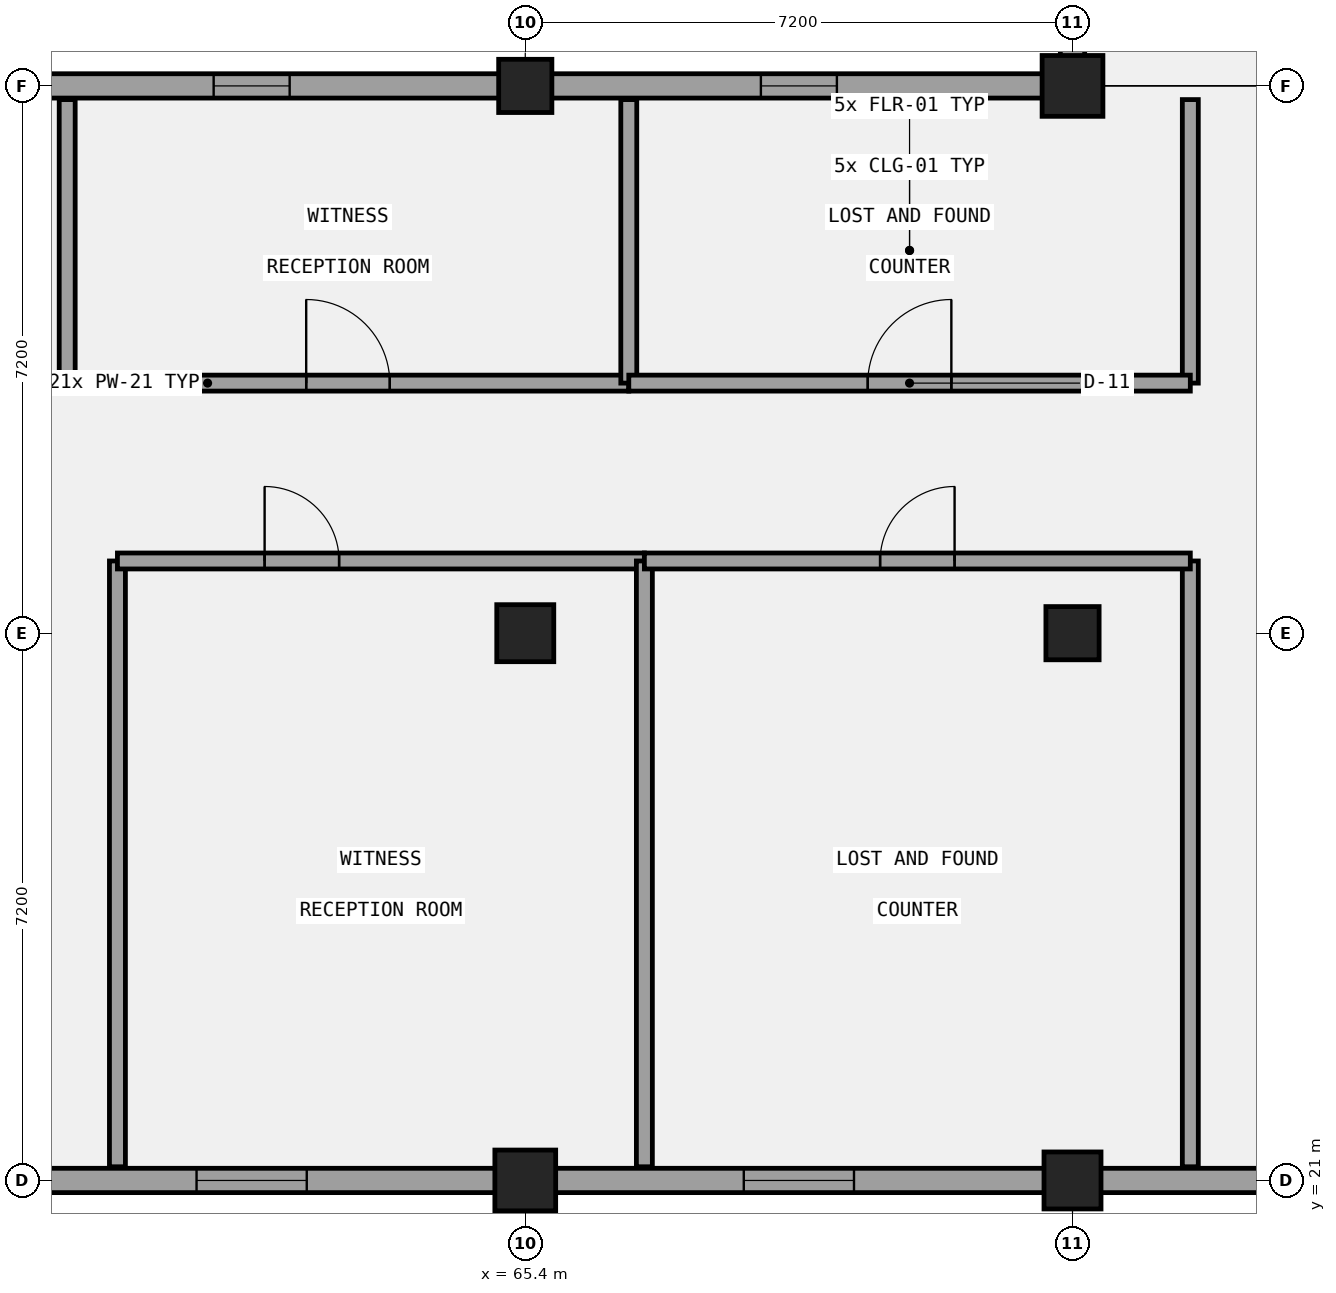
"""IFC4 building model, lengths in metres.
Left out: names, types, materials, properties, quantities, classifications, styles, units other than length and angle.
Written with IfcOpenShell. Run it as: python <this file> out.ifc"""

import sys

from ifc_helpers import new_model, si_unit, direction, frame, frame_2d, origin, origin_2d, place, context, subcontext, project, spatial, rectangle, circle, extrude, element, fill, save


model = new_model("IFC4")
c1 = context("Model", 3, precision=1e-05, world=origin(), true_north=direction((0.0, 1.0)))
c2 = subcontext(c1, "Body", "Model", "MODEL_VIEW")
j1 = project(units=[si_unit("LENGTHUNIT", "METRE"), si_unit("PLANEANGLEUNIT", "RADIAN")], contexts=[c1])
p1 = place(None, origin())
s1 = spatial("IfcSite", under=j1, at=p1, CompositionType="ELEMENT")
p2 = place(p1, origin())
s2 = spatial("IfcBuilding", under=s1, at=p2, CompositionType="ELEMENT")
p3 = place(p2, origin())
s3 = spatial("IfcBuildingStorey", under=s2, at=p3, CompositionType="ELEMENT", Elevation=0.0)
p4 = place(p3, frame((65.4, 21.0, 0.0), z_axis=(0.0, 0.0, 1.0), x_axis=(1.0, 0.0, 0.0)))
e1 = element("IfcColumn", 1, at=p4, inside=s3, PredefinedType="COLUMN", context=c2, shape_type="SweptSolid", body=[
    extrude(rectangle(XDim=0.8, YDim=0.8, at=origin_2d()), origin(), (0.0, 0.0, 1.0), 5.4),
])
p5 = place(p3, frame((65.4, 28.2, 0.0), z_axis=(0.0, 0.0, 1.0), x_axis=(1.0, 0.0, 0.0)))
e2 = element("IfcColumn", 2, at=p5, inside=s3, PredefinedType="COLUMN", context=c2, shape_type="SweptSolid", body=[
    extrude(rectangle(XDim=0.75, YDim=0.75, at=origin_2d()), origin(), (0.0, 0.0, 1.0), 5.4),
])
p6 = place(p3, frame((65.4, 35.4, 0.0), z_axis=(0.0, 0.0, 1.0), x_axis=(1.0, 0.0, 0.0)))
e3 = element("IfcColumn", 3, at=p6, inside=s3, PredefinedType="COLUMN", context=c2, shape_type="SweptSolid", body=[
    extrude(rectangle(XDim=0.7, YDim=0.7, at=origin_2d()), origin(), (0.0, 0.0, 1.0), 5.4),
])
p7 = place(p3, frame((72.6, 21.0, 0.0), z_axis=(0.0, 0.0, 1.0), x_axis=(1.0, 0.0, 0.0)))
e4 = element("IfcColumn", 4, at=p7, inside=s3, PredefinedType="COLUMN", context=c2, shape_type="SweptSolid", body=[
    extrude(rectangle(XDim=0.75, YDim=0.75, at=origin_2d()), origin(), (0.0, 0.0, 1.0), 5.4),
])
p8 = place(p3, frame((72.6, 28.2, 0.0), z_axis=(0.0, 0.0, 1.0), x_axis=(1.0, 0.0, 0.0)))
e5 = element("IfcColumn", 5, at=p8, inside=s3, PredefinedType="COLUMN", context=c2, shape_type="SweptSolid", body=[
    extrude(rectangle(XDim=0.7, YDim=0.7, at=origin_2d()), origin(), (0.0, 0.0, 1.0), 5.4),
])
p9 = place(p3, frame((72.6, 35.4, 0.0), z_axis=(0.0, 0.0, 1.0), x_axis=(1.0, 0.0, 0.0)))
e6 = element("IfcColumn", 6, at=p9, inside=s3, PredefinedType="COLUMN", context=c2, shape_type="SweptSolid", body=[
    extrude(circle(Radius=0.4, at=origin_2d()), origin(), (0.0, 0.0, 1.0), 5.4),
])
p10 = place(p3, frame((29.24, 21.0, 0.0), z_axis=(0.0, 0.0, 1.0), x_axis=(1.0, 0.0, 0.0)))
e7 = element("IfcWall", 7, at=p10, inside=s3, PredefinedType="SOLIDWALL", context=c2, shape_type="SweptSolid", body=[
    extrude(rectangle(XDim=50.72, YDim=0.32, at=frame_2d((25.36, 0.0))), origin(), (0.0, 0.0, 1.0), 3.35),
])
p11 = place(p10, frame((24.36, 0.0, 0.0)))
e8 = element("IfcOpeningElement", 8, at=p11, cuts=e7, PredefinedType="OPENING", context=c2, shape_type="SweptSolid", body=[
    extrude(rectangle(XDim=2.0, YDim=2.6, at=frame_2d((1.0, 1.3))), frame((0.0, 0.17, 0.0), z_axis=(0.0, -1.0, 0.0), x_axis=(1.0, 0.0, 0.0)), (0.0, 0.0, 1.0), 0.34),
])
p12 = place(p10, frame((3.035, 0.0, 1.0)))
e9 = element("IfcOpeningElement", 9, at=p12, cuts=e7, PredefinedType="OPENING", context=c2, shape_type="SweptSolid", body=[
    extrude(rectangle(XDim=1.45, YDim=1.65, at=frame_2d((0.725, 0.825))), frame((0.0, 0.17, 0.0), z_axis=(0.0, -1.0, 0.0), x_axis=(1.0, 0.0, 0.0)), (0.0, 0.0, 1.0), 0.34),
])
p13 = place(p10, frame((10.235, 0.0, 1.0)))
e10 = element("IfcOpeningElement", 10, at=p13, cuts=e7, PredefinedType="OPENING", context=c2, shape_type="SweptSolid", body=[
    extrude(rectangle(XDim=1.45, YDim=1.65, at=frame_2d((0.725, 0.825))), frame((0.0, 0.17, 0.0), z_axis=(0.0, -1.0, 0.0), x_axis=(1.0, 0.0, 0.0)), (0.0, 0.0, 1.0), 0.34),
])
p14 = place(p10, frame((17.435, 0.0, 1.0)))
e11 = element("IfcOpeningElement", 11, at=p14, cuts=e7, PredefinedType="OPENING", context=c2, shape_type="SweptSolid", body=[
    extrude(rectangle(XDim=1.45, YDim=1.65, at=frame_2d((0.725, 0.825))), frame((0.0, 0.17, 0.0), z_axis=(0.0, -1.0, 0.0), x_axis=(1.0, 0.0, 0.0)), (0.0, 0.0, 1.0), 0.34),
])
p15 = place(p10, frame((31.835, 0.0, 1.0)))
e12 = element("IfcOpeningElement", 12, at=p15, cuts=e7, PredefinedType="OPENING", context=c2, shape_type="SweptSolid", body=[
    extrude(rectangle(XDim=1.45, YDim=1.65, at=frame_2d((0.725, 0.825))), frame((0.0, 0.17, 0.0), z_axis=(0.0, -1.0, 0.0), x_axis=(1.0, 0.0, 0.0)), (0.0, 0.0, 1.0), 0.34),
])
p16 = place(p10, frame((39.035, 0.0, 1.0)))
e13 = element("IfcOpeningElement", 13, at=p16, cuts=e7, PredefinedType="OPENING", context=c2, shape_type="SweptSolid", body=[
    extrude(rectangle(XDim=1.45, YDim=1.65, at=frame_2d((0.725, 0.825))), frame((0.0, 0.17, 0.0), z_axis=(0.0, -1.0, 0.0), x_axis=(1.0, 0.0, 0.0)), (0.0, 0.0, 1.0), 0.34),
])
p17 = place(p10, frame((46.235, 0.0, 1.0)))
e14 = element("IfcOpeningElement", 14, at=p17, cuts=e7, PredefinedType="OPENING", context=c2, shape_type="SweptSolid", body=[
    extrude(rectangle(XDim=1.45, YDim=1.65, at=frame_2d((0.725, 0.825))), frame((0.0, 0.17, 0.0), z_axis=(0.0, -1.0, 0.0), x_axis=(1.0, 0.0, 0.0)), (0.0, 0.0, 1.0), 0.34),
])
p18 = place(p3, frame((72.6, 78.44, 0.0), z_axis=(0.0, 0.0, 1.0), x_axis=(0.0, -1.0, 0.0)))
e15 = element("IfcWall", 15, at=p18, inside=s3, PredefinedType="SOLIDWALL", context=c2, shape_type="SweptSolid", body=[
    extrude(rectangle(XDim=42.88, YDim=0.32, at=frame_2d((21.44, 0.0))), origin(), (0.0, 0.0, 1.0), 4.22),
])
p19 = place(p18, frame((38.86, 0.0, 1.0)))
e16 = element("IfcOpeningElement", 16, at=p19, cuts=e15, PredefinedType="OPENING", context=c2, shape_type="SweptSolid", body=[
    extrude(rectangle(XDim=1.0, YDim=1.65, at=frame_2d((0.5, 0.825))), frame((0.0, 0.17, 0.0), z_axis=(0.0, -1.0, 0.0), x_axis=(1.0, 0.0, 0.0)), (0.0, 0.0, 1.0), 0.34),
])
p20 = place(p18, frame((31.74, 0.0, 1.0)))
e17 = element("IfcOpeningElement", 17, at=p20, cuts=e15, PredefinedType="OPENING", context=c2, shape_type="SweptSolid", body=[
    extrude(rectangle(XDim=1.0, YDim=1.65, at=frame_2d((0.5, 0.825))), frame((0.0, 0.17, 0.0), z_axis=(0.0, -1.0, 0.0), x_axis=(1.0, 0.0, 0.0)), (0.0, 0.0, 1.0), 0.34),
])
p21 = place(p18, frame((24.54, 0.0, 1.0)))
e18 = element("IfcOpeningElement", 18, at=p21, cuts=e15, PredefinedType="OPENING", context=c2, shape_type="SweptSolid", body=[
    extrude(rectangle(XDim=1.0, YDim=1.65, at=frame_2d((0.5, 0.825))), frame((0.0, 0.17, 0.0), z_axis=(0.0, -1.0, 0.0), x_axis=(1.0, 0.0, 0.0)), (0.0, 0.0, 1.0), 0.34),
])
p22 = place(p18, frame((17.34, 0.0, 1.0)))
e19 = element("IfcOpeningElement", 19, at=p22, cuts=e15, PredefinedType="OPENING", context=c2, shape_type="SweptSolid", body=[
    extrude(rectangle(XDim=1.0, YDim=1.65, at=frame_2d((0.5, 0.825))), frame((0.0, 0.17, 0.0), z_axis=(0.0, -1.0, 0.0), x_axis=(1.0, 0.0, 0.0)), (0.0, 0.0, 1.0), 0.34),
])
p23 = place(p18, frame((10.14, 0.0, 1.0)))
e20 = element("IfcOpeningElement", 20, at=p23, cuts=e15, PredefinedType="OPENING", context=c2, shape_type="SweptSolid", body=[
    extrude(rectangle(XDim=1.0, YDim=1.65, at=frame_2d((0.5, 0.825))), frame((0.0, 0.17, 0.0), z_axis=(0.0, -1.0, 0.0), x_axis=(1.0, 0.0, 0.0)), (0.0, 0.0, 1.0), 0.34),
])
p24 = place(p18, frame((3.02, 0.0, 1.0)))
e21 = element("IfcOpeningElement", 21, at=p24, cuts=e15, PredefinedType="OPENING", context=c2, shape_type="SweptSolid", body=[
    extrude(rectangle(XDim=1.0, YDim=1.65, at=frame_2d((0.5, 0.825))), frame((0.0, 0.17, 0.0), z_axis=(0.0, -1.0, 0.0), x_axis=(1.0, 0.0, 0.0)), (0.0, 0.0, 1.0), 0.34),
])
p25 = place(p3, frame((72.76, 35.4, 0.0), z_axis=(0.0, 0.0, 1.0), x_axis=(-1.0, 0.0, 0.0)))
e22 = element("IfcWall", 22, at=p25, inside=s3, PredefinedType="SOLIDWALL", context=c2, shape_type="SweptSolid", body=[
    extrude(rectangle(XDim=43.52, YDim=0.32, at=frame_2d((21.76, 0.0))), origin(), (0.0, 0.0, 1.0), 4.12),
])
p26 = place(p25, frame((39.26, 0.0, 1.0)))
e23 = element("IfcOpeningElement", 23, at=p26, cuts=e22, PredefinedType="OPENING", context=c2, shape_type="SweptSolid", body=[
    extrude(rectangle(XDim=1.0, YDim=1.9, at=frame_2d((0.5, 0.95))), frame((0.0, 0.17, 0.0), z_axis=(0.0, -1.0, 0.0), x_axis=(1.0, 0.0, 0.0)), (0.0, 0.0, 1.0), 0.34),
])
p27 = place(p25, frame((32.06, 0.0, 1.0)))
e24 = element("IfcOpeningElement", 24, at=p27, cuts=e22, PredefinedType="OPENING", context=c2, shape_type="SweptSolid", body=[
    extrude(rectangle(XDim=1.0, YDim=1.9, at=frame_2d((0.5, 0.95))), frame((0.0, 0.17, 0.0), z_axis=(0.0, -1.0, 0.0), x_axis=(1.0, 0.0, 0.0)), (0.0, 0.0, 1.0), 0.34),
])
p28 = place(p25, frame((24.86, 0.0, 1.0)))
e25 = element("IfcOpeningElement", 25, at=p28, cuts=e22, PredefinedType="OPENING", context=c2, shape_type="SweptSolid", body=[
    extrude(rectangle(XDim=1.0, YDim=1.9, at=frame_2d((0.5, 0.95))), frame((0.0, 0.17, 0.0), z_axis=(0.0, -1.0, 0.0), x_axis=(1.0, 0.0, 0.0)), (0.0, 0.0, 1.0), 0.34),
])
p29 = place(p25, frame((17.66, 0.0, 1.0)))
e26 = element("IfcOpeningElement", 26, at=p29, cuts=e22, PredefinedType="OPENING", context=c2, shape_type="SweptSolid", body=[
    extrude(rectangle(XDim=1.0, YDim=1.9, at=frame_2d((0.5, 0.95))), frame((0.0, 0.17, 0.0), z_axis=(0.0, -1.0, 0.0), x_axis=(1.0, 0.0, 0.0)), (0.0, 0.0, 1.0), 0.34),
])
p30 = place(p25, frame((10.46, 0.0, 1.0)))
e27 = element("IfcOpeningElement", 27, at=p30, cuts=e22, PredefinedType="OPENING", context=c2, shape_type="SweptSolid", body=[
    extrude(rectangle(XDim=1.0, YDim=1.9, at=frame_2d((0.5, 0.95))), frame((0.0, 0.17, 0.0), z_axis=(0.0, -1.0, 0.0), x_axis=(1.0, 0.0, 0.0)), (0.0, 0.0, 1.0), 0.34),
])
p31 = place(p25, frame((3.26, 0.0, 1.0)))
e28 = element("IfcOpeningElement", 28, at=p31, cuts=e22, PredefinedType="OPENING", context=c2, shape_type="SweptSolid", body=[
    extrude(rectangle(XDim=1.0, YDim=1.9, at=frame_2d((0.5, 0.95))), frame((0.0, 0.17, 0.0), z_axis=(0.0, -1.0, 0.0), x_axis=(1.0, 0.0, 0.0)), (0.0, 0.0, 1.0), 0.34),
])
for number, where, z_axis, x_axis in (
    (29, (74.15, 21.18, 0.0), (0.0, 0.0, 1.0), (0.0, 1.0, 0.0)),
    (30, (60.034, 21.18, 0.0), (0.0, 0.0, 1.0), (0.0, 1.0, 0.0)),
):
    element("IfcWall", number, at=place(p3, frame(where, z_axis=z_axis, x_axis=x_axis)), inside=s3, PredefinedType="PARTITIONING", context=c2, shape_type="SweptSolid", body=[
        extrude(rectangle(XDim=7.97, YDim=0.21, at=frame_2d((3.985, 0.0))), origin(), (0.0, 0.0, 1.0), 5.12),
    ])
p32 = place(p3, frame((60.034, 29.15, 0.0), z_axis=(0.0, 0.0, 1.0), x_axis=(1.0, 0.0, 0.0)))
e31 = element("IfcWall", 31, at=p32, inside=s3, PredefinedType="PARTITIONING", context=c2, shape_type="SweptSolid", body=[
    extrude(rectangle(XDim=6.933, YDim=0.21, at=frame_2d((3.467, 0.0))), origin(), (0.0, 0.0, 1.0), 5.12),
])
p33 = place(p32, frame((1.937, 0.0, 0.0)))
e32 = element("IfcOpeningElement", 32, at=p33, cuts=e31, PredefinedType="OPENING", context=c2, shape_type="SweptSolid", body=[
    extrude(rectangle(XDim=0.98, YDim=2.1, at=frame_2d((0.49, 1.05))), frame((0.0, 0.115, 0.0), z_axis=(0.0, -1.0, 0.0), x_axis=(1.0, 0.0, 0.0)), (0.0, 0.0, 1.0), 0.23),
])
p34 = place(p3, frame((66.967, 21.18, 0.0), z_axis=(0.0, 0.0, 1.0), x_axis=(0.0, 1.0, 0.0)))
e33 = element("IfcWall", 33, at=p34, inside=s3, PredefinedType="PARTITIONING", context=c2, shape_type="SweptSolid", body=[
    extrude(rectangle(XDim=7.97, YDim=0.21, at=frame_2d((3.985, 0.0))), origin(), (0.0, 0.0, 1.0), 5.12),
])
p35 = place(p3, frame((66.967, 29.15, 0.0), z_axis=(0.0, 0.0, 1.0), x_axis=(1.0, 0.0, 0.0)))
e34 = element("IfcWall", 34, at=p35, inside=s3, PredefinedType="PARTITIONING", context=c2, shape_type="SweptSolid", body=[
    extrude(rectangle(XDim=7.183, YDim=0.21, at=frame_2d((3.591, 0.0))), origin(), (0.0, 0.0, 1.0), 5.12),
])
p36 = place(p35, frame((3.102, 0.0, 0.0)))
e35 = element("IfcOpeningElement", 35, at=p36, cuts=e34, PredefinedType="OPENING", context=c2, shape_type="SweptSolid", body=[
    extrude(rectangle(XDim=0.98, YDim=2.22, at=frame_2d((0.49, 1.11))), frame((0.0, 0.115, 0.0), z_axis=(0.0, -1.0, 0.0), x_axis=(1.0, 0.0, 0.0)), (0.0, 0.0, 1.0), 0.23),
])
p37 = place(p3, frame((74.15, 31.49, 0.0), z_axis=(0.0, 0.0, 1.0), x_axis=(0.0, 1.0, 0.0)))
e36 = element("IfcWall", 36, at=p37, inside=s3, PredefinedType="PARTITIONING", context=c2, shape_type="SweptSolid", body=[
    extrude(rectangle(XDim=3.73, YDim=0.21, at=frame_2d((1.865, 0.0))), origin(), (0.0, 0.0, 1.0), 5.12),
])
p38 = place(p3, frame((51.985, 31.49, 0.0), z_axis=(0.0, 0.0, 1.0), x_axis=(1.0, 0.0, 0.0)))
e37 = element("IfcWall", 37, at=p38, inside=s3, PredefinedType="PARTITIONING", context=c2, shape_type="SweptSolid", body=[
    extrude(rectangle(XDim=7.388, YDim=0.21, at=frame_2d((3.694, 0.0))), origin(), (0.0, 0.0, 1.0), 5.12),
])
p39 = place(p38, frame((3.174, 0.0, 0.0)))
e38 = element("IfcOpeningElement", 38, at=p39, cuts=e37, PredefinedType="OPENING", context=c2, shape_type="SweptSolid", body=[
    extrude(rectangle(XDim=1.04, YDim=2.35, at=frame_2d((0.52, 1.175))), frame((0.0, 0.115, 0.0), z_axis=(0.0, -1.0, 0.0), x_axis=(1.0, 0.0, 0.0)), (0.0, 0.0, 1.0), 0.23),
])
p40 = place(p3, frame((59.373, 31.49, 0.0), z_axis=(0.0, 0.0, 1.0), x_axis=(0.0, 1.0, 0.0)))
e39 = element("IfcWall", 39, at=p40, inside=s3, PredefinedType="PARTITIONING", context=c2, shape_type="SweptSolid", body=[
    extrude(rectangle(XDim=3.73, YDim=0.21, at=frame_2d((1.865, 0.0))), origin(), (0.0, 0.0, 1.0), 5.12),
])
p41 = place(p3, frame((59.373, 31.49, 0.0), z_axis=(0.0, 0.0, 1.0), x_axis=(1.0, 0.0, 0.0)))
e40 = element("IfcWall", 40, at=p41, inside=s3, PredefinedType="PARTITIONING", context=c2, shape_type="SweptSolid", body=[
    extrude(rectangle(XDim=7.389, YDim=0.21, at=frame_2d((3.694, 0.0))), origin(), (0.0, 0.0, 1.0), 5.12),
])
p42 = place(p41, frame((3.145, 0.0, 0.0)))
e41 = element("IfcOpeningElement", 41, at=p42, cuts=e40, PredefinedType="OPENING", context=c2, shape_type="SweptSolid", body=[
    extrude(rectangle(XDim=1.1, YDim=2.1, at=frame_2d((0.55, 1.05))), frame((0.0, 0.115, 0.0), z_axis=(0.0, -1.0, 0.0), x_axis=(1.0, 0.0, 0.0)), (0.0, 0.0, 1.0), 0.23),
])
p43 = place(p3, frame((66.762, 31.49, 0.0), z_axis=(0.0, 0.0, 1.0), x_axis=(0.0, 1.0, 0.0)))
e42 = element("IfcWall", 42, at=p43, inside=s3, PredefinedType="PARTITIONING", context=c2, shape_type="SweptSolid", body=[
    extrude(rectangle(XDim=3.73, YDim=0.21, at=frame_2d((1.865, 0.0))), origin(), (0.0, 0.0, 1.0), 5.12),
])
p44 = place(p3, frame((66.762, 31.49, 0.0), z_axis=(0.0, 0.0, 1.0), x_axis=(1.0, 0.0, 0.0)))
e43 = element("IfcWall", 43, at=p44, inside=s3, PredefinedType="PARTITIONING", context=c2, shape_type="SweptSolid", body=[
    extrude(rectangle(XDim=7.388, YDim=0.21, at=frame_2d((3.694, 0.0))), origin(), (0.0, 0.0, 1.0), 5.12),
])
p45 = place(p44, frame((3.144, 0.0, 0.0)))
e44 = element("IfcOpeningElement", 44, at=p45, cuts=e43, PredefinedType="OPENING", context=c2, shape_type="SweptSolid", body=[
    extrude(rectangle(XDim=1.1, YDim=2.22, at=frame_2d((0.55, 1.11))), frame((0.0, 0.115, 0.0), z_axis=(0.0, -1.0, 0.0), x_axis=(1.0, 0.0, 0.0)), (0.0, 0.0, 1.0), 0.23),
])
p46 = place(p15, origin())
e45 = element("IfcWindow", 45, at=p46, inside=s3, PartitioningType="SINGLE_PANEL", PredefinedType="WINDOW", context=c2, shape_type="SweptSolid", body=[
    extrude(rectangle(XDim=1.45, YDim=1.65, at=frame_2d((0.725, 0.825))), frame((0.0, 0.03, 0.0), z_axis=(0.0, -1.0, 0.0), x_axis=(1.0, 0.0, 0.0)), (0.0, 0.0, 1.0), 0.06),
])
fill(e12, e45)
p47 = place(p16, origin())
e46 = element("IfcWindow", 46, at=p47, inside=s3, PartitioningType="SINGLE_PANEL", PredefinedType="WINDOW", context=c2, shape_type="SweptSolid", body=[
    extrude(rectangle(XDim=1.45, YDim=1.65, at=frame_2d((0.725, 0.825))), frame((0.0, 0.03, 0.0), z_axis=(0.0, -1.0, 0.0), x_axis=(1.0, 0.0, 0.0)), (0.0, 0.0, 1.0), 0.06),
])
fill(e13, e46)
p48 = place(p30, origin())
e47 = element("IfcWindow", 47, at=p48, inside=s3, PartitioningType="SINGLE_PANEL", PredefinedType="WINDOW", context=c2, shape_type="SweptSolid", body=[
    extrude(rectangle(XDim=1.0, YDim=1.9, at=frame_2d((0.5, 0.95))), frame((0.0, 0.03, 0.0), z_axis=(0.0, -1.0, 0.0), x_axis=(1.0, 0.0, 0.0)), (0.0, 0.0, 1.0), 0.06),
])
fill(e27, e47)
p49 = place(p31, origin())
e48 = element("IfcWindow", 48, at=p49, inside=s3, PartitioningType="SINGLE_PANEL", PredefinedType="WINDOW", context=c2, shape_type="SweptSolid", body=[
    extrude(rectangle(XDim=1.0, YDim=1.9, at=frame_2d((0.5, 0.95))), frame((0.0, 0.03, 0.0), z_axis=(0.0, -1.0, 0.0), x_axis=(1.0, 0.0, 0.0)), (0.0, 0.0, 1.0), 0.06),
])
fill(e28, e48)
p50 = place(p33, frame((0.98, 0.0, 0.0), z_axis=(0.0, 0.0, 1.0), x_axis=(-1.0, 0.0, 0.0)))
e49 = element("IfcDoor", 49, at=p50, inside=s3, OperationType="SINGLE_SWING_LEFT", PredefinedType="DOOR", context=c2, shape_type="SweptSolid", body=[
    extrude(rectangle(XDim=0.98, YDim=2.1, at=frame_2d((0.49, 1.05))), frame((0.0, 0.025, 0.0), z_axis=(0.0, -1.0, 0.0), x_axis=(1.0, 0.0, 0.0)), (0.0, 0.0, 1.0), 0.05),
])
fill(e32, e49)
p51 = place(p36, frame((0.98, 0.0, 0.0), z_axis=(0.0, 0.0, 1.0), x_axis=(-1.0, 0.0, 0.0)))
e50 = element("IfcDoor", 50, at=p51, inside=s3, OperationType="SINGLE_SWING_RIGHT", PredefinedType="DOOR", context=c2, shape_type="SweptSolid", body=[
    extrude(rectangle(XDim=0.98, YDim=2.22, at=frame_2d((0.49, 1.11))), frame((0.0, 0.025, 0.0), z_axis=(0.0, -1.0, 0.0), x_axis=(1.0, 0.0, 0.0)), (0.0, 0.0, 1.0), 0.05),
])
fill(e35, e50)
p52 = place(p42, origin())
e51 = element("IfcDoor", 51, at=p52, inside=s3, OperationType="SINGLE_SWING_LEFT", PredefinedType="DOOR", context=c2, shape_type="SweptSolid", body=[
    extrude(rectangle(XDim=1.1, YDim=2.1, at=frame_2d((0.55, 1.05))), frame((0.0, 0.025, 0.0), z_axis=(0.0, -1.0, 0.0), x_axis=(1.0, 0.0, 0.0)), (0.0, 0.0, 1.0), 0.05),
])
fill(e41, e51)
p53 = place(p45, origin())
e52 = element("IfcDoor", 52, at=p53, inside=s3, OperationType="SINGLE_SWING_RIGHT", PredefinedType="DOOR", context=c2, shape_type="SweptSolid", body=[
    extrude(rectangle(XDim=1.1, YDim=2.22, at=frame_2d((0.55, 1.11))), frame((0.0, 0.025, 0.0), z_axis=(0.0, -1.0, 0.0), x_axis=(1.0, 0.0, 0.0)), (0.0, 0.0, 1.0), 0.05),
])
fill(e44, e52)
save(model, sys.argv[1])
